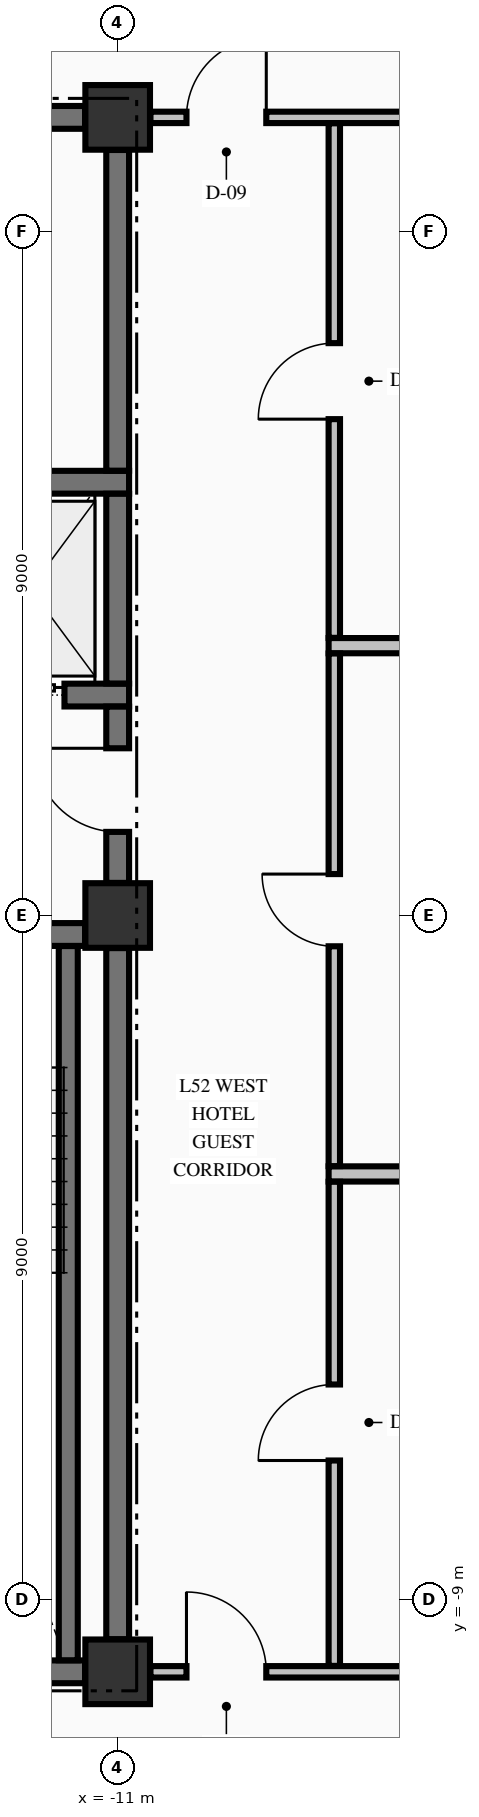
"""IFC4 building model, lengths in metres.
Left out: names, types, materials, properties, quantities, classifications, styles, units other than length and angle.
Written with IfcOpenShell. Run it as: python <this file> out.ifc"""

import sys

from ifc_helpers import new_model, si_unit, direction, frame, frame_2d, origin, origin_2d, place, context, subcontext, project, spatial, rectangle, extrude, element, fill, save


model = new_model("IFC4")
c1 = context("Model", 3, precision=1e-05, world=origin(), true_north=direction((0.0, 1.0)))
c2 = subcontext(c1, "Body", "Model", "MODEL_VIEW")
j1 = project(units=[si_unit("LENGTHUNIT", "METRE"), si_unit("PLANEANGLEUNIT", "RADIAN")], contexts=[c1])
p1 = place(None, origin())
s1 = spatial("IfcSite", under=j1, at=p1, CompositionType="ELEMENT")
p2 = place(p1, origin())
s2 = spatial("IfcBuilding", under=s1, at=p2, CompositionType="ELEMENT")
p3 = place(p2, frame((0.0, 0.0, 201.66)))
s3 = spatial("IfcBuildingStorey", under=s2, at=p3, CompositionType="ELEMENT", Elevation=201.66)
for number, where, z_axis, x_axis in (
    (1, (-11.0, -9.95, -0.25), (0.0, 0.0, 1.0), (1.0, 0.0, 0.0)),
    (2, (-11.0, 0.0, -0.25), (0.0, 0.0, 1.0), (1.0, 0.0, 0.0)),
    (3, (-11.0, 10.5, -0.25), (0.0, 0.0, 1.0), (1.0, 0.0, 0.0)),
):
    element("IfcColumn", number, at=place(p3, frame(where, z_axis=z_axis, x_axis=x_axis)), inside=s3, PredefinedType="COLUMN", context=c2, shape_type="SweptSolid", body=[
        extrude(rectangle(XDim=0.85, YDim=0.85, at=origin_2d()), origin(), (0.0, 0.0, 1.0), 3.4),
    ])
p4 = place(p3, frame((-14.7, -9.95, 0.0), z_axis=(0.0, 0.0, 1.0), x_axis=(1.0, 0.0, 0.0)))
e4 = element("IfcWall", 4, at=p4, inside=s3, PredefinedType="SHEAR", context=c2, shape_type="SweptSolid", body=[
    extrude(rectangle(XDim=3.271, YDim=0.3, at=frame_2d((1.635, 0.0))), origin(), (0.0, 0.0, 1.0), 3.15),
])
p5 = place(p3, frame((-19.571, -0.25, 0.0), z_axis=(0.0, 0.0, 1.0), x_axis=(1.0, 0.0, 0.0)))
e5 = element("IfcWall", 5, at=p5, inside=s3, PredefinedType="SHEAR", context=c2, shape_type="SweptSolid", body=[
    extrude(rectangle(XDim=8.142, YDim=0.3, at=frame_2d((4.071, 0.0))), origin(), (0.0, 0.0, 1.0), 3.15),
])
p6 = place(p5, frame((5.871, 0.0, 0.0)))
e6 = element("IfcOpeningElement", 6, at=p6, cuts=e5, PredefinedType="OPENING", context=c2, shape_type="SweptSolid", body=[
    extrude(rectangle(XDim=1.1, YDim=2.15, at=frame_2d((0.55, 1.075))), frame((0.0, 0.16, 0.0), z_axis=(0.0, -1.0, 0.0), x_axis=(1.0, 0.0, 0.0)), (0.0, 0.0, 1.0), 0.32),
])
p7 = place(p3, frame((-14.875, 2.9, 0.0), z_axis=(0.0, 0.0, 1.0), x_axis=(1.0, 0.0, 0.0)))
e7 = element("IfcWall", 7, at=p7, inside=s3, PredefinedType="SHEAR", context=c2, shape_type="SweptSolid", body=[
    extrude(rectangle(XDim=4.025, YDim=0.3, at=frame_2d((2.012, 0.0))), origin(), (0.0, 0.0, 1.0), 3.15),
])
p8 = place(p7, frame((2.075, 0.0, 0.0)))
e8 = element("IfcOpeningElement", 8, at=p8, cuts=e7, PredefinedType="OPENING", context=c2, shape_type="SweptSolid", body=[
    extrude(rectangle(XDim=1.1, YDim=2.2, at=frame_2d((0.55, 1.1))), frame((0.0, 0.16, 0.0), z_axis=(0.0, -1.0, 0.0), x_axis=(1.0, 0.0, 0.0)), (0.0, 0.0, 1.0), 0.32),
])
p9 = place(p3, frame((-14.875, 5.7, 0.0), z_axis=(0.0, 0.0, 1.0), x_axis=(1.0, 0.0, 0.0)))
e9 = element("IfcWall", 9, at=p9, inside=s3, PredefinedType="SHEAR", context=c2, shape_type="SweptSolid", body=[
    extrude(rectangle(XDim=4.025, YDim=0.3, at=frame_2d((2.012, 0.0))), origin(), (0.0, 0.0, 1.0), 3.15),
])
p10 = place(p3, frame((-14.7, 10.5, 0.0), z_axis=(0.0, 0.0, 1.0), x_axis=(1.0, 0.0, 0.0)))
e10 = element("IfcWall", 10, at=p10, inside=s3, PredefinedType="SHEAR", context=c2, shape_type="SweptSolid", body=[
    extrude(rectangle(XDim=3.271, YDim=0.3, at=frame_2d((1.635, 0.0))), origin(), (0.0, 0.0, 1.0), 3.15),
])
p11 = place(p10, frame((0.775, 0.0, 0.0)))
e11 = element("IfcOpeningElement", 11, at=p11, cuts=e10, PredefinedType="OPENING", context=c2, shape_type="SweptSolid", body=[
    extrude(rectangle(XDim=0.95, YDim=2.15, at=frame_2d((0.475, 1.075))), frame((0.0, 0.16, 0.0), z_axis=(0.0, -1.0, 0.0), x_axis=(1.0, 0.0, 0.0)), (0.0, 0.0, 1.0), 0.32),
])
p12 = place(p3, frame((-10.569, -9.95, 0.0), z_axis=(0.0, 0.0, 1.0), x_axis=(1.0, 0.0, 0.0)))
e12 = element("IfcWall", 12, at=p12, inside=s3, PredefinedType="PARTITIONING", context=c2, shape_type="SweptSolid", body=[
    extrude(rectangle(XDim=21.138, YDim=0.15, at=frame_2d((10.569, 0.0))), origin(), (0.0, 0.0, 1.0), 3.15),
])
p13 = place(p12, frame((0.474, 0.0, 0.0)))
e13 = element("IfcOpeningElement", 13, at=p13, cuts=e12, PredefinedType="OPENING", context=c2, shape_type="SweptSolid", body=[
    extrude(rectangle(XDim=1.05, YDim=2.15, at=frame_2d((0.525, 1.075))), frame((0.0, 0.085, 0.0), z_axis=(0.0, -1.0, 0.0), x_axis=(1.0, 0.0, 0.0)), (0.0, 0.0, 1.0), 0.17),
])
p14 = place(p12, frame((19.614, 0.0, 0.0)))
e14 = element("IfcOpeningElement", 14, at=p14, cuts=e12, PredefinedType="OPENING", context=c2, shape_type="SweptSolid", body=[
    extrude(rectangle(XDim=1.05, YDim=2.15, at=frame_2d((0.525, 1.075))), frame((0.0, 0.085, 0.0), z_axis=(0.0, -1.0, 0.0), x_axis=(1.0, 0.0, 0.0)), (0.0, 0.0, 1.0), 0.17),
])
p15 = place(p12, frame((13.574, 0.0, 0.0)))
e15 = element("IfcOpeningElement", 15, at=p15, cuts=e12, PredefinedType="OPENING", context=c2, shape_type="SweptSolid", body=[
    extrude(rectangle(XDim=0.95, YDim=2.15, at=frame_2d((0.475, 1.075))), frame((0.0, 0.085, 0.0), z_axis=(0.0, -1.0, 0.0), x_axis=(1.0, 0.0, 0.0)), (0.0, 0.0, 1.0), 0.17),
])
for number, where, z_axis, x_axis in (
    (16, (-8.225, -3.4, 0.0), (0.0, 0.0, 1.0), (1.0, 0.0, 0.0)),
    (17, (-8.225, 3.55, 0.0), (0.0, 0.0, 1.0), (1.0, 0.0, 0.0)),
):
    element("IfcWall", number, at=place(p3, frame(where, z_axis=z_axis, x_axis=x_axis)), inside=s3, PredefinedType="PARTITIONING", context=c2, shape_type="SweptSolid", body=[
        extrude(rectangle(XDim=10.125, YDim=0.2, at=frame_2d((5.062, 0.0))), origin(), (0.0, 0.0, 1.0), 3.15),
    ])
p16 = place(p3, frame((-10.569, 10.5, 0.0), z_axis=(0.0, 0.0, 1.0), x_axis=(1.0, 0.0, 0.0)))
e18 = element("IfcWall", 18, at=p16, inside=s3, PredefinedType="PARTITIONING", context=c2, shape_type="SweptSolid", body=[
    extrude(rectangle(XDim=21.138, YDim=0.15, at=frame_2d((10.569, 0.0))), origin(), (0.0, 0.0, 1.0), 3.15),
])
p17 = place(p16, frame((0.474, 0.0, 0.0)))
e19 = element("IfcOpeningElement", 19, at=p17, cuts=e18, PredefinedType="OPENING", context=c2, shape_type="SweptSolid", body=[
    extrude(rectangle(XDim=1.05, YDim=2.15, at=frame_2d((0.525, 1.075))), frame((0.0, 0.085, 0.0), z_axis=(0.0, -1.0, 0.0), x_axis=(1.0, 0.0, 0.0)), (0.0, 0.0, 1.0), 0.17),
])
p18 = place(p16, frame((19.614, 0.0, 0.0)))
e20 = element("IfcOpeningElement", 20, at=p18, cuts=e18, PredefinedType="OPENING", context=c2, shape_type="SweptSolid", body=[
    extrude(rectangle(XDim=1.05, YDim=2.15, at=frame_2d((0.525, 1.075))), frame((0.0, 0.085, 0.0), z_axis=(0.0, -1.0, 0.0), x_axis=(1.0, 0.0, 0.0)), (0.0, 0.0, 1.0), 0.17),
])
p19 = place(p3, frame((-11.65, -9.798, 0.0), z_axis=(0.0, 0.0, 1.0), x_axis=(0.0, 1.0, 0.0)))
e21 = element("IfcWall", 21, at=p19, inside=s3, PredefinedType="SOLIDWALL", context=c2, shape_type="SweptSolid", body=[
    extrude(rectangle(XDim=9.396, YDim=0.25, at=frame_2d((4.698, 0.0))), origin(), (0.0, 0.0, 1.0), 3.15),
])
p20 = place(p3, frame((-11.0, -9.521, 0.0), z_axis=(0.0, 0.0, 1.0), x_axis=(0.0, 1.0, 0.0)))
e22 = element("IfcWall", 22, at=p20, inside=s3, PredefinedType="SHEAR", context=c2, shape_type="SweptSolid", body=[
    extrude(rectangle(XDim=9.092, YDim=0.3, at=frame_2d((4.546, 0.0))), origin(), (0.0, 0.0, 1.0), 3.15),
])
p21 = place(p3, frame((-11.0, 0.429, 0.0), z_axis=(0.0, 0.0, 1.0), x_axis=(0.0, 1.0, 0.0)))
e23 = element("IfcWall", 23, at=p21, inside=s3, PredefinedType="SHEAR", context=c2, shape_type="SweptSolid", body=[
    extrude(rectangle(XDim=2.319, YDim=0.3, at=frame_2d((1.16, 0.0))), origin(), (0.0, 0.0, 1.0), 3.15),
])
p22 = place(p21, frame((0.671, 0.0, 0.0)))
e24 = element("IfcOpeningElement", 24, at=p22, cuts=e23, PredefinedType="OPENING", context=c2, shape_type="SweptSolid", body=[
    extrude(rectangle(XDim=1.1, YDim=2.15, at=frame_2d((0.55, 1.075))), frame((0.0, 0.16, 0.0), z_axis=(0.0, -1.0, 0.0), x_axis=(1.0, 0.0, 0.0)), (0.0, 0.0, 1.0), 0.32),
])
p23 = place(p3, frame((-11.0, 3.052, 0.0), z_axis=(0.0, 0.0, 1.0), x_axis=(0.0, 1.0, 0.0)))
e25 = element("IfcWall", 25, at=p23, inside=s3, PredefinedType="SHEAR", context=c2, shape_type="SweptSolid", body=[
    extrude(rectangle(XDim=2.496, YDim=0.3, at=frame_2d((1.248, 0.0))), origin(), (0.0, 0.0, 1.0), 3.15),
])
p24 = place(p3, frame((-11.0, 5.852, 0.0), z_axis=(0.0, 0.0, 1.0), x_axis=(0.0, 1.0, 0.0)))
e26 = element("IfcWall", 26, at=p24, inside=s3, PredefinedType="SHEAR", context=c2, shape_type="SweptSolid", body=[
    extrude(rectangle(XDim=4.219, YDim=0.3, at=frame_2d((2.109, 0.0))), origin(), (0.0, 0.0, 1.0), 3.15),
])
p25 = place(p3, frame((-8.15, -9.872, 0.0), z_axis=(0.0, 0.0, 1.0), x_axis=(0.0, 1.0, 0.0)))
e27 = element("IfcWall", 27, at=p25, inside=s3, PredefinedType="PARTITIONING", context=c2, shape_type="SweptSolid", body=[
    extrude(rectangle(XDim=6.369, YDim=0.15, at=frame_2d((3.185, 0.0))), origin(), (0.0, 0.0, 1.0), 3.15),
])
p26 = place(p25, frame((2.702, 0.0, 0.0)))
e28 = element("IfcOpeningElement", 28, at=p26, cuts=e27, PredefinedType="OPENING", context=c2, shape_type="SweptSolid", body=[
    extrude(rectangle(XDim=1.0, YDim=2.15, at=frame_2d((0.5, 1.075))), frame((0.0, 0.085, 0.0), z_axis=(0.0, -1.0, 0.0), x_axis=(1.0, 0.0, 0.0)), (0.0, 0.0, 1.0), 0.17),
])
p27 = place(p3, frame((-8.15, -3.297, 0.0), z_axis=(0.0, 0.0, 1.0), x_axis=(0.0, 1.0, 0.0)))
e29 = element("IfcWall", 29, at=p27, inside=s3, PredefinedType="PARTITIONING", context=c2, shape_type="SweptSolid", body=[
    extrude(rectangle(XDim=6.744, YDim=0.15, at=frame_2d((3.372, 0.0))), origin(), (0.0, 0.0, 1.0), 3.15),
])
p28 = place(p27, frame((2.892, 0.0, 0.0)))
e30 = element("IfcOpeningElement", 30, at=p28, cuts=e29, PredefinedType="OPENING", context=c2, shape_type="SweptSolid", body=[
    extrude(rectangle(XDim=0.95, YDim=2.15, at=frame_2d((0.475, 1.075))), frame((0.0, 0.085, 0.0), z_axis=(0.0, -1.0, 0.0), x_axis=(1.0, 0.0, 0.0)), (0.0, 0.0, 1.0), 0.17),
])
p29 = place(p3, frame((-8.15, 3.653, 0.0), z_axis=(0.0, 0.0, 1.0), x_axis=(0.0, 1.0, 0.0)))
e31 = element("IfcWall", 31, at=p29, inside=s3, PredefinedType="PARTITIONING", context=c2, shape_type="SweptSolid", body=[
    extrude(rectangle(XDim=6.769, YDim=0.15, at=frame_2d((3.385, 0.0))), origin(), (0.0, 0.0, 1.0), 3.15),
])
p30 = place(p29, frame((2.877, 0.0, 0.0)))
e32 = element("IfcOpeningElement", 32, at=p30, cuts=e31, PredefinedType="OPENING", context=c2, shape_type="SweptSolid", body=[
    extrude(rectangle(XDim=1.0, YDim=2.15, at=frame_2d((0.5, 1.075))), frame((0.0, 0.085, 0.0), z_axis=(0.0, -1.0, 0.0), x_axis=(1.0, 0.0, 0.0)), (0.0, 0.0, 1.0), 0.17),
])
p31 = place(p22, origin())
e33 = element("IfcDoor", 33, at=p31, inside=s3, OperationType="SINGLE_SWING_RIGHT", PredefinedType="DOOR", context=c2, shape_type="SweptSolid", body=[
    extrude(rectangle(XDim=1.1, YDim=2.15, at=frame_2d((0.55, 1.075))), frame((0.0, 0.025, 0.0), z_axis=(0.0, -1.0, 0.0), x_axis=(1.0, 0.0, 0.0)), (0.0, 0.0, 1.0), 0.05),
])
fill(e24, e33)
p32 = place(p8, origin())
e34 = element("IfcDoor", 34, at=p32, inside=s3, OperationType="SLIDING_TO_LEFT", PredefinedType="DOOR", context=c2, shape_type="SweptSolid", body=[
    extrude(rectangle(XDim=1.1, YDim=2.2, at=frame_2d((0.55, 1.1))), frame((0.0, 0.025, 0.0), z_axis=(0.0, -1.0, 0.0), x_axis=(1.0, 0.0, 0.0)), (0.0, 0.0, 1.0), 0.05),
])
fill(e8, e34)
p33 = place(p17, origin())
e35 = element("IfcDoor", 35, at=p33, inside=s3, OperationType="SINGLE_SWING_RIGHT", PredefinedType="DOOR", context=c2, shape_type="SweptSolid", body=[
    extrude(rectangle(XDim=1.05, YDim=2.15, at=frame_2d((0.525, 1.075))), frame((0.0, 0.025, 0.0), z_axis=(0.0, -1.0, 0.0), x_axis=(1.0, 0.0, 0.0)), (0.0, 0.0, 1.0), 0.05),
])
fill(e19, e35)
p34 = place(p13, origin())
e36 = element("IfcDoor", 36, at=p34, inside=s3, OperationType="SINGLE_SWING_LEFT", PredefinedType="DOOR", context=c2, shape_type="SweptSolid", body=[
    extrude(rectangle(XDim=1.05, YDim=2.15, at=frame_2d((0.525, 1.075))), frame((0.0, 0.025, 0.0), z_axis=(0.0, -1.0, 0.0), x_axis=(1.0, 0.0, 0.0)), (0.0, 0.0, 1.0), 0.05),
])
fill(e13, e36)
p35 = place(p30, origin())
e37 = element("IfcDoor", 37, at=p35, inside=s3, OperationType="SINGLE_SWING_LEFT", PredefinedType="DOOR", context=c2, shape_type="SweptSolid", body=[
    extrude(rectangle(XDim=1.0, YDim=2.15, at=frame_2d((0.5, 1.075))), frame((0.0, 0.025, 0.0), z_axis=(0.0, -1.0, 0.0), x_axis=(1.0, 0.0, 0.0)), (0.0, 0.0, 1.0), 0.05),
])
fill(e32, e37)
p36 = place(p28, origin())
e38 = element("IfcDoor", 38, at=p36, inside=s3, OperationType="SINGLE_SWING_RIGHT", PredefinedType="DOOR", context=c2, shape_type="SweptSolid", body=[
    extrude(rectangle(XDim=0.95, YDim=2.15, at=frame_2d((0.475, 1.075))), frame((0.0, 0.025, 0.0), z_axis=(0.0, -1.0, 0.0), x_axis=(1.0, 0.0, 0.0)), (0.0, 0.0, 1.0), 0.05),
])
fill(e30, e38)
p37 = place(p26, origin())
e39 = element("IfcDoor", 39, at=p37, inside=s3, OperationType="SINGLE_SWING_LEFT", PredefinedType="DOOR", context=c2, shape_type="SweptSolid", body=[
    extrude(rectangle(XDim=1.0, YDim=2.15, at=frame_2d((0.5, 1.075))), frame((0.0, 0.025, 0.0), z_axis=(0.0, -1.0, 0.0), x_axis=(1.0, 0.0, 0.0)), (0.0, 0.0, 1.0), 0.05),
])
fill(e28, e39)
save(model, sys.argv[1])
